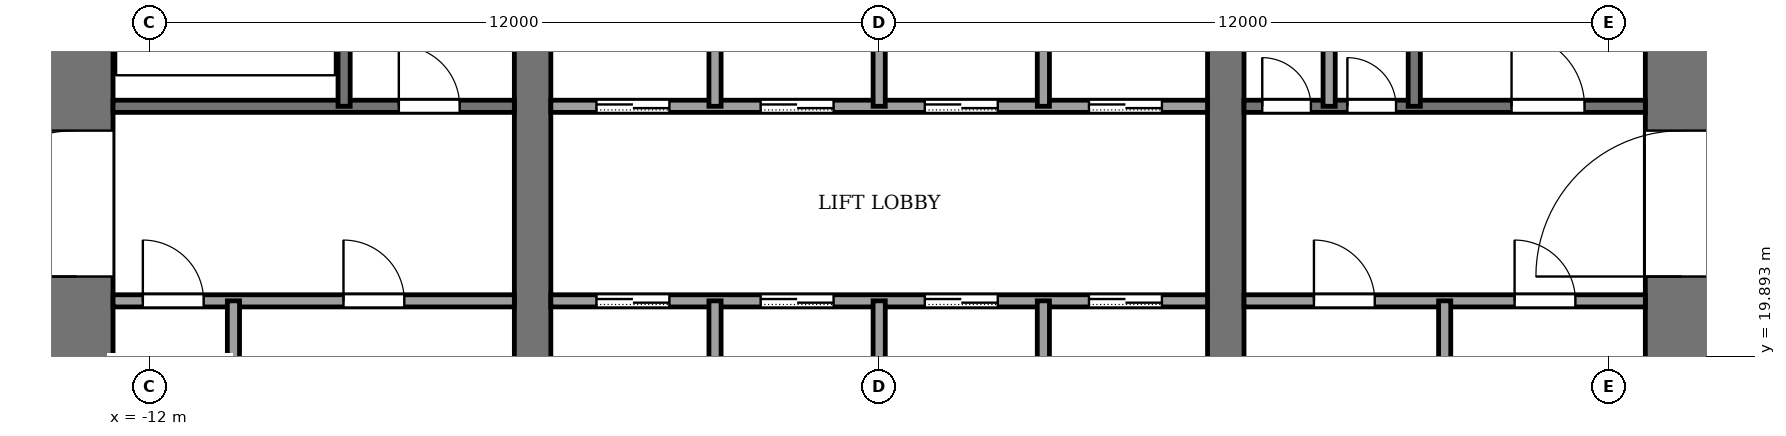
"""IFC4 building model, lengths in metres.
Left out: names, types, materials, properties, quantities, classifications, styles, units other than length and angle.
Written with IfcOpenShell. Run it as: python <this file> out.ifc"""

import sys

from ifc_helpers import new_model, si_unit, direction, frame, frame_2d, origin, place, context, subcontext, project, spatial, rectangle, extrude, element, fill, save


model = new_model("IFC4")
c1 = context("Model", 3, precision=1e-05, world=origin(), true_north=direction((0.0, 1.0)))
c2 = subcontext(c1, "Body", "Model", "MODEL_VIEW")
j1 = project(units=[si_unit("LENGTHUNIT", "METRE"), si_unit("PLANEANGLEUNIT", "RADIAN")], contexts=[c1])
p1 = place(None, origin())
s1 = spatial("IfcSite", under=j1, at=p1, CompositionType="ELEMENT")
p2 = place(p1, origin())
s2 = spatial("IfcBuilding", under=s1, at=p2, CompositionType="ELEMENT")
p3 = place(p2, frame((0.0, 0.0, 65.0)))
s3 = spatial("IfcBuildingStorey", under=s2, at=p3, CompositionType="ELEMENT", Elevation=65.0)
p4 = place(p3, frame((-13.2, 18.4, -0.13), z_axis=(0.0, 0.0, 1.0), x_axis=(0.0, 1.0, 0.0)))
e1 = element("IfcWall", 1, at=p4, inside=s3, PredefinedType="SHEAR", context=c2, shape_type="SweptSolid", body=[
    extrude(rectangle(XDim=19.2, YDim=1.2, at=frame_2d((9.6, 0.0))), origin(), (0.0, 0.0, 1.0), 5.0),
])
p5 = place(p4, frame((2.8, 0.0, 0.13)))
e2 = element("IfcOpeningElement", 2, at=p5, cuts=e1, PredefinedType="OPENING", context=c2, shape_type="SweptSolid", body=[
    extrude(rectangle(XDim=2.4, YDim=2.4, at=frame_2d((1.2, 1.2))), frame((0.0, 0.61, 0.0), z_axis=(0.0, -1.0, 0.0), x_axis=(1.0, 0.0, 0.0)), (0.0, 0.0, 1.0), 1.22),
])
p6 = place(p4, frame((13.4, 0.0, 0.13)))
e3 = element("IfcOpeningElement", 3, at=p6, cuts=e1, PredefinedType="OPENING", context=c2, shape_type="SweptSolid", body=[
    extrude(rectangle(XDim=1.4, YDim=2.2, at=frame_2d((0.7, 1.1))), frame((0.0, 0.61, 0.0), z_axis=(0.0, -1.0, 0.0), x_axis=(1.0, 0.0, 0.0)), (0.0, 0.0, 1.0), 1.22),
])
p7 = place(p3, frame((13.2, 18.4, -0.13), z_axis=(0.0, 0.0, 1.0), x_axis=(0.0, 1.0, 0.0)))
e4 = element("IfcWall", 4, at=p7, inside=s3, PredefinedType="SHEAR", context=c2, shape_type="SweptSolid", body=[
    extrude(rectangle(XDim=19.2, YDim=1.2, at=frame_2d((9.6, 0.0))), origin(), (0.0, 0.0, 1.0), 5.0),
])
p8 = place(p7, frame((2.8, 0.0, 0.13)))
e5 = element("IfcOpeningElement", 5, at=p8, cuts=e4, PredefinedType="OPENING", context=c2, shape_type="SweptSolid", body=[
    extrude(rectangle(XDim=2.4, YDim=2.4, at=frame_2d((1.2, 1.2))), frame((0.0, 0.61, 0.0), z_axis=(0.0, -1.0, 0.0), x_axis=(1.0, 0.0, 0.0)), (0.0, 0.0, 1.0), 1.22),
])
p9 = place(p7, frame((13.3, 0.0, 0.13)))
e6 = element("IfcOpeningElement", 6, at=p9, cuts=e4, PredefinedType="OPENING", context=c2, shape_type="SweptSolid", body=[
    extrude(rectangle(XDim=2.4, YDim=2.4, at=frame_2d((1.2, 1.2))), frame((0.0, 0.61, 0.0), z_axis=(0.0, -1.0, 0.0), x_axis=(1.0, 0.0, 0.0)), (0.0, 0.0, 1.0), 1.22),
])
p10 = place(p3, frame((-5.7, 18.4, -0.13), z_axis=(0.0, 0.0, 1.0), x_axis=(0.0, 1.0, 0.0)))
e7 = element("IfcWall", 7, at=p10, inside=s3, PredefinedType="SHEAR", context=c2, shape_type="SweptSolid", body=[
    extrude(rectangle(XDim=19.2, YDim=0.6, at=frame_2d((9.6, 0.0))), origin(), (0.0, 0.0, 1.0), 5.0),
])
p11 = place(p10, frame((8.35, 0.0, 0.13)))
e8 = element("IfcOpeningElement", 8, at=p11, cuts=e7, PredefinedType="OPENING", context=c2, shape_type="SweptSolid", body=[
    extrude(rectangle(XDim=0.9, YDim=2.1, at=frame_2d((0.45, 1.05))), frame((0.0, 0.31, 0.0), z_axis=(0.0, -1.0, 0.0), x_axis=(1.0, 0.0, 0.0)), (0.0, 0.0, 1.0), 0.62),
])
p12 = place(p3, frame((5.7, 18.4, -0.13), z_axis=(0.0, 0.0, 1.0), x_axis=(0.0, 1.0, 0.0)))
e9 = element("IfcWall", 9, at=p12, inside=s3, PredefinedType="SHEAR", context=c2, shape_type="SweptSolid", body=[
    extrude(rectangle(XDim=19.2, YDim=0.6, at=frame_2d((9.6, 0.0))), origin(), (0.0, 0.0, 1.0), 5.0),
])
p13 = place(p12, frame((13.3, 0.0, 0.13)))
e10 = element("IfcOpeningElement", 10, at=p13, cuts=e9, PredefinedType="OPENING", context=c2, shape_type="SweptSolid", body=[
    extrude(rectangle(XDim=2.4, YDim=2.4, at=frame_2d((1.2, 1.2))), frame((0.0, 0.31, 0.0), z_axis=(0.0, -1.0, 0.0), x_axis=(1.0, 0.0, 0.0)), (0.0, 0.0, 1.0), 0.62),
])
p14 = place(p3, frame((-12.6, 20.8, 0.0), z_axis=(0.0, 0.0, 1.0), x_axis=(1.0, 0.0, 0.0)))
e11 = element("IfcWall", 11, at=p14, inside=s3, PredefinedType="PARTITIONING", context=c2, shape_type="SweptSolid", body=[
    extrude(rectangle(XDim=6.6, YDim=0.2, at=frame_2d((3.3, 0.0))), origin(), (0.0, 0.0, 1.0), 4.87),
])
p15 = place(p14, frame((0.49, 0.0, 0.0)))
e12 = element("IfcOpeningElement", 12, at=p15, cuts=e11, PredefinedType="OPENING", context=c2, shape_type="SweptSolid", body=[
    extrude(rectangle(XDim=1.0, YDim=2.1, at=frame_2d((0.5, 1.05))), frame((0.0, 0.11, 0.0), z_axis=(0.0, -1.0, 0.0), x_axis=(1.0, 0.0, 0.0)), (0.0, 0.0, 1.0), 0.22),
])
p16 = place(p14, frame((3.79, 0.0, 0.0)))
e13 = element("IfcOpeningElement", 13, at=p16, cuts=e11, PredefinedType="OPENING", context=c2, shape_type="SweptSolid", body=[
    extrude(rectangle(XDim=1.0, YDim=2.1, at=frame_2d((0.5, 1.05))), frame((0.0, 0.11, 0.0), z_axis=(0.0, -1.0, 0.0), x_axis=(1.0, 0.0, 0.0)), (0.0, 0.0, 1.0), 0.22),
])
p17 = place(p3, frame((-5.4, 20.8, 0.0), z_axis=(0.0, 0.0, 1.0), x_axis=(1.0, 0.0, 0.0)))
e14 = element("IfcWall", 14, at=p17, inside=s3, PredefinedType="PARTITIONING", context=c2, shape_type="SweptSolid", body=[
    extrude(rectangle(XDim=10.8, YDim=0.2, at=frame_2d((5.4, 0.0))), origin(), (0.0, 0.0, 1.0), 4.87),
])
p18 = place(p17, frame((0.75, 0.0, 0.0)))
e15 = element("IfcOpeningElement", 15, at=p18, cuts=e14, PredefinedType="OPENING", context=c2, shape_type="SweptSolid", body=[
    extrude(rectangle(XDim=1.2, YDim=2.2, at=frame_2d((0.6, 1.1))), frame((0.0, 0.11, 0.0), z_axis=(0.0, -1.0, 0.0), x_axis=(1.0, 0.0, 0.0)), (0.0, 0.0, 1.0), 0.22),
])
p19 = place(p17, frame((3.45, 0.0, 0.0)))
e16 = element("IfcOpeningElement", 16, at=p19, cuts=e14, PredefinedType="OPENING", context=c2, shape_type="SweptSolid", body=[
    extrude(rectangle(XDim=1.2, YDim=2.2, at=frame_2d((0.6, 1.1))), frame((0.0, 0.11, 0.0), z_axis=(0.0, -1.0, 0.0), x_axis=(1.0, 0.0, 0.0)), (0.0, 0.0, 1.0), 0.22),
])
p20 = place(p17, frame((6.15, 0.0, 0.0)))
e17 = element("IfcOpeningElement", 17, at=p20, cuts=e14, PredefinedType="OPENING", context=c2, shape_type="SweptSolid", body=[
    extrude(rectangle(XDim=1.2, YDim=2.2, at=frame_2d((0.6, 1.1))), frame((0.0, 0.11, 0.0), z_axis=(0.0, -1.0, 0.0), x_axis=(1.0, 0.0, 0.0)), (0.0, 0.0, 1.0), 0.22),
])
p21 = place(p17, frame((8.85, 0.0, 0.0)))
e18 = element("IfcOpeningElement", 18, at=p21, cuts=e14, PredefinedType="OPENING", context=c2, shape_type="SweptSolid", body=[
    extrude(rectangle(XDim=1.2, YDim=2.2, at=frame_2d((0.6, 1.1))), frame((0.0, 0.11, 0.0), z_axis=(0.0, -1.0, 0.0), x_axis=(1.0, 0.0, 0.0)), (0.0, 0.0, 1.0), 0.22),
])
p22 = place(p3, frame((6.0, 20.8, 0.0), z_axis=(0.0, 0.0, 1.0), x_axis=(1.0, 0.0, 0.0)))
e19 = element("IfcWall", 19, at=p22, inside=s3, PredefinedType="PARTITIONING", context=c2, shape_type="SweptSolid", body=[
    extrude(rectangle(XDim=6.6, YDim=0.2, at=frame_2d((3.3, 0.0))), origin(), (0.0, 0.0, 1.0), 4.87),
])
p23 = place(p22, frame((1.15, 0.0, 0.0)))
e20 = element("IfcOpeningElement", 20, at=p23, cuts=e19, PredefinedType="OPENING", context=c2, shape_type="SweptSolid", body=[
    extrude(rectangle(XDim=1.0, YDim=2.1, at=frame_2d((0.5, 1.05))), frame((0.0, 0.11, 0.0), z_axis=(0.0, -1.0, 0.0), x_axis=(1.0, 0.0, 0.0)), (0.0, 0.0, 1.0), 0.22),
])
p24 = place(p22, frame((4.45, 0.0, 0.0)))
e21 = element("IfcOpeningElement", 21, at=p24, cuts=e19, PredefinedType="OPENING", context=c2, shape_type="SweptSolid", body=[
    extrude(rectangle(XDim=1.0, YDim=2.1, at=frame_2d((0.5, 1.05))), frame((0.0, 0.11, 0.0), z_axis=(0.0, -1.0, 0.0), x_axis=(1.0, 0.0, 0.0)), (0.0, 0.0, 1.0), 0.22),
])
p25 = place(p3, frame((-12.6, 24.0, 0.0), z_axis=(0.0, 0.0, 1.0), x_axis=(1.0, 0.0, 0.0)))
e22 = element("IfcWall", 22, at=p25, inside=s3, PredefinedType="PARTITIONING", context=c2, shape_type="SweptSolid", body=[
    extrude(rectangle(XDim=6.6, YDim=0.2, at=frame_2d((3.3, 0.0))), origin(), (0.0, 0.0, 1.0), 4.87),
])
p26 = place(p25, frame((4.7, 0.0, 0.0)))
e23 = element("IfcOpeningElement", 23, at=p26, cuts=e22, PredefinedType="OPENING", context=c2, shape_type="SweptSolid", body=[
    extrude(rectangle(XDim=1.0, YDim=2.1, at=frame_2d((0.5, 1.05))), frame((0.0, 0.11, 0.0), z_axis=(0.0, -1.0, 0.0), x_axis=(1.0, 0.0, 0.0)), (0.0, 0.0, 1.0), 0.22),
])
p27 = place(p3, frame((-5.4, 24.0, 0.0), z_axis=(0.0, 0.0, 1.0), x_axis=(1.0, 0.0, 0.0)))
e24 = element("IfcWall", 24, at=p27, inside=s3, PredefinedType="PARTITIONING", context=c2, shape_type="SweptSolid", body=[
    extrude(rectangle(XDim=10.8, YDim=0.2, at=frame_2d((5.4, 0.0))), origin(), (0.0, 0.0, 1.0), 4.87),
])
p28 = place(p27, frame((0.75, 0.0, 0.0)))
e25 = element("IfcOpeningElement", 25, at=p28, cuts=e24, PredefinedType="OPENING", context=c2, shape_type="SweptSolid", body=[
    extrude(rectangle(XDim=1.2, YDim=2.2, at=frame_2d((0.6, 1.1))), frame((0.0, 0.11, 0.0), z_axis=(0.0, -1.0, 0.0), x_axis=(1.0, 0.0, 0.0)), (0.0, 0.0, 1.0), 0.22),
])
p29 = place(p27, frame((3.45, 0.0, 0.0)))
e26 = element("IfcOpeningElement", 26, at=p29, cuts=e24, PredefinedType="OPENING", context=c2, shape_type="SweptSolid", body=[
    extrude(rectangle(XDim=1.2, YDim=2.2, at=frame_2d((0.6, 1.1))), frame((0.0, 0.11, 0.0), z_axis=(0.0, -1.0, 0.0), x_axis=(1.0, 0.0, 0.0)), (0.0, 0.0, 1.0), 0.22),
])
p30 = place(p27, frame((6.15, 0.0, 0.0)))
e27 = element("IfcOpeningElement", 27, at=p30, cuts=e24, PredefinedType="OPENING", context=c2, shape_type="SweptSolid", body=[
    extrude(rectangle(XDim=1.2, YDim=2.2, at=frame_2d((0.6, 1.1))), frame((0.0, 0.11, 0.0), z_axis=(0.0, -1.0, 0.0), x_axis=(1.0, 0.0, 0.0)), (0.0, 0.0, 1.0), 0.22),
])
p31 = place(p27, frame((8.85, 0.0, 0.0)))
e28 = element("IfcOpeningElement", 28, at=p31, cuts=e24, PredefinedType="OPENING", context=c2, shape_type="SweptSolid", body=[
    extrude(rectangle(XDim=1.2, YDim=2.2, at=frame_2d((0.6, 1.1))), frame((0.0, 0.11, 0.0), z_axis=(0.0, -1.0, 0.0), x_axis=(1.0, 0.0, 0.0)), (0.0, 0.0, 1.0), 0.22),
])
p32 = place(p3, frame((6.0, 24.0, 0.0), z_axis=(0.0, 0.0, 1.0), x_axis=(1.0, 0.0, 0.0)))
e29 = element("IfcWall", 29, at=p32, inside=s3, PredefinedType="PARTITIONING", context=c2, shape_type="SweptSolid", body=[
    extrude(rectangle(XDim=6.6, YDim=0.2, at=frame_2d((3.3, 0.0))), origin(), (0.0, 0.0, 1.0), 4.87),
])
p33 = place(p32, frame((0.3, 0.0, 0.0)))
e30 = element("IfcOpeningElement", 30, at=p33, cuts=e29, PredefinedType="OPENING", context=c2, shape_type="SweptSolid", body=[
    extrude(rectangle(XDim=0.8, YDim=2.1, at=frame_2d((0.4, 1.05))), frame((0.0, 0.11, 0.0), z_axis=(0.0, -1.0, 0.0), x_axis=(1.0, 0.0, 0.0)), (0.0, 0.0, 1.0), 0.22),
])
p34 = place(p32, frame((1.7, 0.0, 0.0)))
e31 = element("IfcOpeningElement", 31, at=p34, cuts=e29, PredefinedType="OPENING", context=c2, shape_type="SweptSolid", body=[
    extrude(rectangle(XDim=0.8, YDim=2.1, at=frame_2d((0.4, 1.05))), frame((0.0, 0.11, 0.0), z_axis=(0.0, -1.0, 0.0), x_axis=(1.0, 0.0, 0.0)), (0.0, 0.0, 1.0), 0.22),
])
p35 = place(p32, frame((4.4, 0.0, 0.0)))
e32 = element("IfcOpeningElement", 32, at=p35, cuts=e29, PredefinedType="OPENING", context=c2, shape_type="SweptSolid", body=[
    extrude(rectangle(XDim=1.2, YDim=2.2, at=frame_2d((0.6, 1.1))), frame((0.0, 0.11, 0.0), z_axis=(0.0, -1.0, 0.0), x_axis=(1.0, 0.0, 0.0)), (0.0, 0.0, 1.0), 0.22),
])
p36 = place(p3, frame((-10.62, 18.4, 0.0), z_axis=(0.0, 0.0, 1.0), x_axis=(0.0, 1.0, 0.0)))
e33 = element("IfcWall", 33, at=p36, inside=s3, PredefinedType="PARTITIONING", context=c2, shape_type="SweptSolid", body=[
    extrude(rectangle(XDim=2.4, YDim=0.2, at=frame_2d((1.2, 0.0))), origin(), (0.0, 0.0, 1.0), 4.87),
])
p37 = place(p3, frame((-8.8, 24.0, 0.0), z_axis=(0.0, 0.0, 1.0), x_axis=(0.0, 1.0, 0.0)))
e34 = element("IfcWall", 34, at=p37, inside=s3, PredefinedType="PARTITIONING", context=c2, shape_type="SweptSolid", body=[
    extrude(rectangle(XDim=7.4, YDim=0.2, at=frame_2d((3.7, 0.0))), origin(), (0.0, 0.0, 1.0), 4.87),
])
p38 = place(p3, frame((-2.7, 18.4, 0.0), z_axis=(0.0, 0.0, 1.0), x_axis=(0.0, 1.0, 0.0)))
e35 = element("IfcWall", 35, at=p38, inside=s3, PredefinedType="PARTITIONING", context=c2, shape_type="SweptSolid", body=[
    extrude(rectangle(XDim=2.4, YDim=0.2, at=frame_2d((1.2, 0.0))), origin(), (0.0, 0.0, 1.0), 4.87),
])
p39 = place(p3, frame((-2.7, 24.0, 0.0), z_axis=(0.0, 0.0, 1.0), x_axis=(0.0, 1.0, 0.0)))
e36 = element("IfcWall", 36, at=p39, inside=s3, PredefinedType="PARTITIONING", context=c2, shape_type="SweptSolid", body=[
    extrude(rectangle(XDim=2.4, YDim=0.2, at=frame_2d((1.2, 0.0))), origin(), (0.0, 0.0, 1.0), 4.87),
])
p40 = place(p3, frame((0.0, 18.4, 0.0), z_axis=(0.0, 0.0, 1.0), x_axis=(0.0, 1.0, 0.0)))
e37 = element("IfcWall", 37, at=p40, inside=s3, PredefinedType="PARTITIONING", context=c2, shape_type="SweptSolid", body=[
    extrude(rectangle(XDim=2.4, YDim=0.2, at=frame_2d((1.2, 0.0))), origin(), (0.0, 0.0, 1.0), 4.87),
])
p41 = place(p3, frame((0.0, 24.0, 0.0), z_axis=(0.0, 0.0, 1.0), x_axis=(0.0, 1.0, 0.0)))
e38 = element("IfcWall", 38, at=p41, inside=s3, PredefinedType="PARTITIONING", context=c2, shape_type="SweptSolid", body=[
    extrude(rectangle(XDim=2.4, YDim=0.2, at=frame_2d((1.2, 0.0))), origin(), (0.0, 0.0, 1.0), 4.87),
])
p42 = place(p3, frame((2.7, 18.4, 0.0), z_axis=(0.0, 0.0, 1.0), x_axis=(0.0, 1.0, 0.0)))
e39 = element("IfcWall", 39, at=p42, inside=s3, PredefinedType="PARTITIONING", context=c2, shape_type="SweptSolid", body=[
    extrude(rectangle(XDim=2.4, YDim=0.2, at=frame_2d((1.2, 0.0))), origin(), (0.0, 0.0, 1.0), 4.87),
])
p43 = place(p3, frame((2.7, 24.0, 0.0), z_axis=(0.0, 0.0, 1.0), x_axis=(0.0, 1.0, 0.0)))
e40 = element("IfcWall", 40, at=p43, inside=s3, PredefinedType="PARTITIONING", context=c2, shape_type="SweptSolid", body=[
    extrude(rectangle(XDim=2.4, YDim=0.2, at=frame_2d((1.2, 0.0))), origin(), (0.0, 0.0, 1.0), 4.87),
])
for number, where, z_axis, x_axis in (
    (41, (7.4, 24.0, 0.0), (0.0, 0.0, 1.0), (0.0, 1.0, 0.0)),
    (42, (8.8, 24.0, 0.0), (0.0, 0.0, 1.0), (0.0, 1.0, 0.0)),
):
    element("IfcWall", number, at=place(p3, frame(where, z_axis=z_axis, x_axis=x_axis)), inside=s3, PredefinedType="PARTITIONING", context=c2, shape_type="SweptSolid", body=[
        extrude(rectangle(XDim=7.4, YDim=0.2, at=frame_2d((3.7, 0.0))), origin(), (0.0, 0.0, 1.0), 4.87),
    ])
p44 = place(p3, frame((9.3, 18.4, 0.0), z_axis=(0.0, 0.0, 1.0), x_axis=(0.0, 1.0, 0.0)))
e43 = element("IfcWall", 43, at=p44, inside=s3, PredefinedType="PARTITIONING", context=c2, shape_type="SweptSolid", body=[
    extrude(rectangle(XDim=2.4, YDim=0.2, at=frame_2d((1.2, 0.0))), origin(), (0.0, 0.0, 1.0), 4.87),
])
p45 = place(p18, origin())
e44 = element("IfcDoor", 44, at=p45, inside=s3, OperationType="SLIDING_TO_LEFT", PredefinedType="DOOR", context=c2, shape_type="SweptSolid", body=[
    extrude(rectangle(XDim=1.2, YDim=2.2, at=frame_2d((0.6, 1.1))), frame((0.0, 0.025, 0.0), z_axis=(0.0, -1.0, 0.0), x_axis=(1.0, 0.0, 0.0)), (0.0, 0.0, 1.0), 0.05),
])
fill(e15, e44)
p46 = place(p19, origin())
e45 = element("IfcDoor", 45, at=p46, inside=s3, OperationType="SLIDING_TO_LEFT", PredefinedType="DOOR", context=c2, shape_type="SweptSolid", body=[
    extrude(rectangle(XDim=1.2, YDim=2.2, at=frame_2d((0.6, 1.1))), frame((0.0, 0.025, 0.0), z_axis=(0.0, -1.0, 0.0), x_axis=(1.0, 0.0, 0.0)), (0.0, 0.0, 1.0), 0.05),
])
fill(e16, e45)
p47 = place(p20, origin())
e46 = element("IfcDoor", 46, at=p47, inside=s3, OperationType="SLIDING_TO_LEFT", PredefinedType="DOOR", context=c2, shape_type="SweptSolid", body=[
    extrude(rectangle(XDim=1.2, YDim=2.2, at=frame_2d((0.6, 1.1))), frame((0.0, 0.025, 0.0), z_axis=(0.0, -1.0, 0.0), x_axis=(1.0, 0.0, 0.0)), (0.0, 0.0, 1.0), 0.05),
])
fill(e17, e46)
p48 = place(p21, origin())
e47 = element("IfcDoor", 47, at=p48, inside=s3, OperationType="SLIDING_TO_LEFT", PredefinedType="DOOR", context=c2, shape_type="SweptSolid", body=[
    extrude(rectangle(XDim=1.2, YDim=2.2, at=frame_2d((0.6, 1.1))), frame((0.0, 0.025, 0.0), z_axis=(0.0, -1.0, 0.0), x_axis=(1.0, 0.0, 0.0)), (0.0, 0.0, 1.0), 0.05),
])
fill(e18, e47)
p49 = place(p28, origin())
e48 = element("IfcDoor", 48, at=p49, inside=s3, OperationType="SLIDING_TO_LEFT", PredefinedType="DOOR", context=c2, shape_type="SweptSolid", body=[
    extrude(rectangle(XDim=1.2, YDim=2.2, at=frame_2d((0.6, 1.1))), frame((0.0, 0.025, 0.0), z_axis=(0.0, -1.0, 0.0), x_axis=(1.0, 0.0, 0.0)), (0.0, 0.0, 1.0), 0.05),
])
fill(e25, e48)
p50 = place(p29, origin())
e49 = element("IfcDoor", 49, at=p50, inside=s3, OperationType="SLIDING_TO_LEFT", PredefinedType="DOOR", context=c2, shape_type="SweptSolid", body=[
    extrude(rectangle(XDim=1.2, YDim=2.2, at=frame_2d((0.6, 1.1))), frame((0.0, 0.025, 0.0), z_axis=(0.0, -1.0, 0.0), x_axis=(1.0, 0.0, 0.0)), (0.0, 0.0, 1.0), 0.05),
])
fill(e26, e49)
p51 = place(p30, origin())
e50 = element("IfcDoor", 50, at=p51, inside=s3, OperationType="SLIDING_TO_LEFT", PredefinedType="DOOR", context=c2, shape_type="SweptSolid", body=[
    extrude(rectangle(XDim=1.2, YDim=2.2, at=frame_2d((0.6, 1.1))), frame((0.0, 0.025, 0.0), z_axis=(0.0, -1.0, 0.0), x_axis=(1.0, 0.0, 0.0)), (0.0, 0.0, 1.0), 0.05),
])
fill(e27, e50)
p52 = place(p31, origin())
e51 = element("IfcDoor", 51, at=p52, inside=s3, OperationType="SLIDING_TO_LEFT", PredefinedType="DOOR", context=c2, shape_type="SweptSolid", body=[
    extrude(rectangle(XDim=1.2, YDim=2.2, at=frame_2d((0.6, 1.1))), frame((0.0, 0.025, 0.0), z_axis=(0.0, -1.0, 0.0), x_axis=(1.0, 0.0, 0.0)), (0.0, 0.0, 1.0), 0.05),
])
fill(e28, e51)
p53 = place(p15, origin())
e52 = element("IfcDoor", 52, at=p53, inside=s3, OperationType="SINGLE_SWING_RIGHT", PredefinedType="DOOR", context=c2, shape_type="SweptSolid", body=[
    extrude(rectangle(XDim=1.0, YDim=2.1, at=frame_2d((0.5, 1.05))), frame((0.0, 0.025, 0.0), z_axis=(0.0, -1.0, 0.0), x_axis=(1.0, 0.0, 0.0)), (0.0, 0.0, 1.0), 0.05),
])
fill(e12, e52)
p54 = place(p16, origin())
e53 = element("IfcDoor", 53, at=p54, inside=s3, OperationType="SINGLE_SWING_RIGHT", PredefinedType="DOOR", context=c2, shape_type="SweptSolid", body=[
    extrude(rectangle(XDim=1.0, YDim=2.1, at=frame_2d((0.5, 1.05))), frame((0.0, 0.025, 0.0), z_axis=(0.0, -1.0, 0.0), x_axis=(1.0, 0.0, 0.0)), (0.0, 0.0, 1.0), 0.05),
])
fill(e13, e53)
p55 = place(p23, origin())
e54 = element("IfcDoor", 54, at=p55, inside=s3, OperationType="SINGLE_SWING_LEFT", PredefinedType="DOOR", context=c2, shape_type="SweptSolid", body=[
    extrude(rectangle(XDim=1.0, YDim=2.1, at=frame_2d((0.5, 1.05))), frame((0.0, 0.025, 0.0), z_axis=(0.0, -1.0, 0.0), x_axis=(1.0, 0.0, 0.0)), (0.0, 0.0, 1.0), 0.05),
])
fill(e20, e54)
p56 = place(p24, origin())
e55 = element("IfcDoor", 55, at=p56, inside=s3, OperationType="SINGLE_SWING_LEFT", PredefinedType="DOOR", context=c2, shape_type="SweptSolid", body=[
    extrude(rectangle(XDim=1.0, YDim=2.1, at=frame_2d((0.5, 1.05))), frame((0.0, 0.025, 0.0), z_axis=(0.0, -1.0, 0.0), x_axis=(1.0, 0.0, 0.0)), (0.0, 0.0, 1.0), 0.05),
])
fill(e21, e55)
p57 = place(p26, origin())
e56 = element("IfcDoor", 56, at=p57, inside=s3, OperationType="SINGLE_SWING_RIGHT", PredefinedType="DOOR", context=c2, shape_type="SweptSolid", body=[
    extrude(rectangle(XDim=1.0, YDim=2.1, at=frame_2d((0.5, 1.05))), frame((0.0, 0.025, 0.0), z_axis=(0.0, -1.0, 0.0), x_axis=(1.0, 0.0, 0.0)), (0.0, 0.0, 1.0), 0.05),
])
fill(e23, e56)
p58 = place(p33, origin())
e57 = element("IfcDoor", 57, at=p58, inside=s3, OperationType="SINGLE_SWING_RIGHT", PredefinedType="DOOR", context=c2, shape_type="SweptSolid", body=[
    extrude(rectangle(XDim=0.8, YDim=2.1, at=frame_2d((0.4, 1.05))), frame((0.0, 0.025, 0.0), z_axis=(0.0, -1.0, 0.0), x_axis=(1.0, 0.0, 0.0)), (0.0, 0.0, 1.0), 0.05),
])
fill(e30, e57)
p59 = place(p34, origin())
e58 = element("IfcDoor", 58, at=p59, inside=s3, OperationType="SINGLE_SWING_LEFT", PredefinedType="DOOR", context=c2, shape_type="SweptSolid", body=[
    extrude(rectangle(XDim=0.8, YDim=2.1, at=frame_2d((0.4, 1.05))), frame((0.0, 0.025, 0.0), z_axis=(0.0, -1.0, 0.0), x_axis=(1.0, 0.0, 0.0)), (0.0, 0.0, 1.0), 0.05),
])
fill(e31, e58)
p60 = place(p35, origin())
e59 = element("IfcDoor", 59, at=p60, inside=s3, OperationType="SINGLE_SWING_RIGHT", PredefinedType="DOOR", context=c2, shape_type="SweptSolid", body=[
    extrude(rectangle(XDim=1.2, YDim=2.2, at=frame_2d((0.6, 1.1))), frame((0.0, 0.025, 0.0), z_axis=(0.0, -1.0, 0.0), x_axis=(1.0, 0.0, 0.0)), (0.0, 0.0, 1.0), 0.05),
])
fill(e32, e59)
p61 = place(p5, origin())
e60 = element("IfcDoor", 60, at=p61, inside=s3, OperationType="DOUBLE_DOOR_SINGLE_SWING", PredefinedType="DOOR", context=c2, shape_type="SweptSolid", body=[
    extrude(rectangle(XDim=2.4, YDim=2.4, at=frame_2d((1.2, 1.2))), frame((0.0, 0.025, 0.0), z_axis=(0.0, -1.0, 0.0), x_axis=(1.0, 0.0, 0.0)), (0.0, 0.0, 1.0), 0.05),
])
fill(e2, e60)
p62 = place(p8, origin())
e61 = element("IfcDoor", 61, at=p62, inside=s3, OperationType="DOUBLE_DOOR_SINGLE_SWING", PredefinedType="DOOR", context=c2, shape_type="SweptSolid", body=[
    extrude(rectangle(XDim=2.4, YDim=2.4, at=frame_2d((1.2, 1.2))), frame((0.0, 0.025, 0.0), z_axis=(0.0, -1.0, 0.0), x_axis=(1.0, 0.0, 0.0)), (0.0, 0.0, 1.0), 0.05),
])
fill(e5, e61)
save(model, sys.argv[1])
